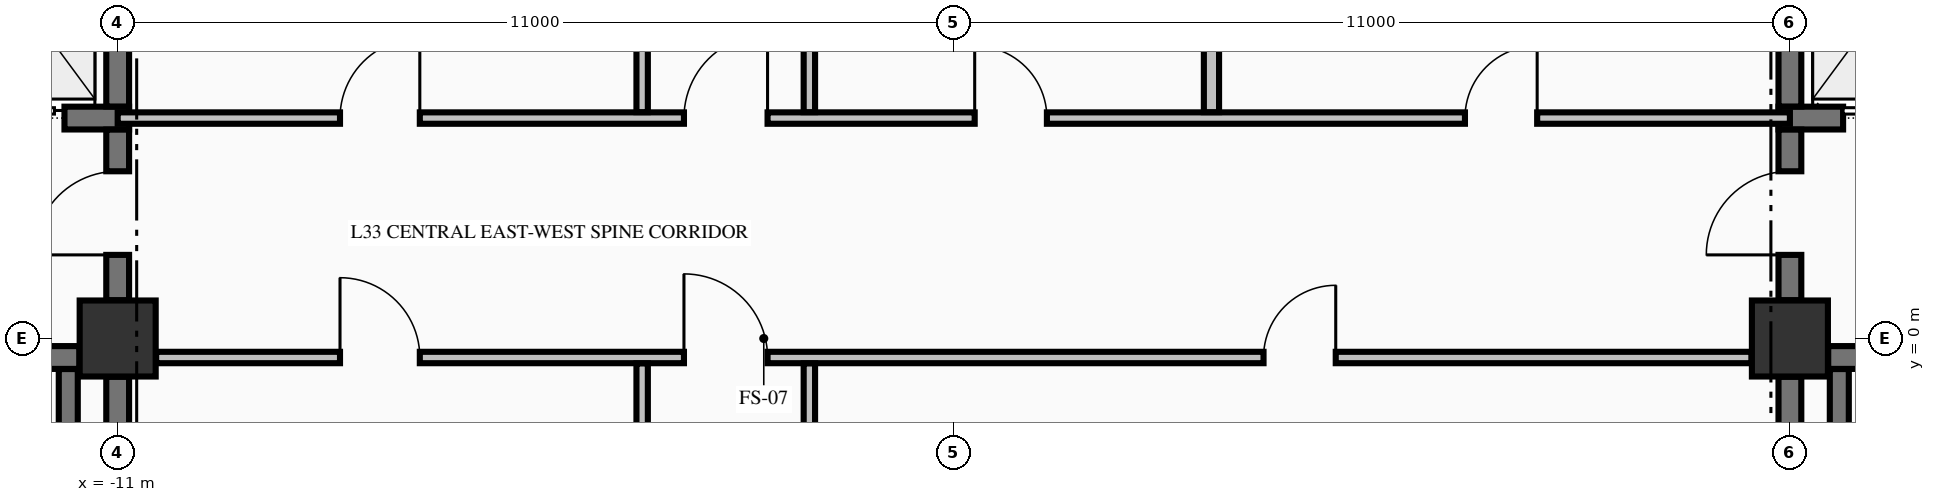
"""IFC4 building model, lengths in metres.
Left out: names, types, materials, properties, quantities, classifications, styles, units other than length and angle.
Written with IfcOpenShell. Run it as: python <this file> out.ifc"""

import sys

from ifc_helpers import new_model, si_unit, direction, frame, frame_2d, origin, origin_2d, place, context, subcontext, project, spatial, rectangle, extrude, element, fill, save


model = new_model("IFC4")
c1 = context("Model", 3, precision=1e-05, world=origin(), true_north=direction((0.0, 1.0)))
c2 = subcontext(c1, "Body", "Model", "MODEL_VIEW")
j1 = project(units=[si_unit("LENGTHUNIT", "METRE"), si_unit("PLANEANGLEUNIT", "RADIAN")], contexts=[c1])
p1 = place(None, origin())
s1 = spatial("IfcSite", under=j1, at=p1, CompositionType="ELEMENT")
p2 = place(p1, origin())
s2 = spatial("IfcBuilding", under=s1, at=p2, CompositionType="ELEMENT")
p3 = place(p2, frame((0.0, 0.0, 132.06)))
s3 = spatial("IfcBuildingStorey", under=s2, at=p3, CompositionType="ELEMENT", Elevation=132.06)
for number, where, z_axis, x_axis in (
    (1, (-11.0, 0.0, -0.25), (0.0, 0.0, 1.0), (1.0, 0.0, 0.0)),
    (2, (11.0, 0.0, -0.25), (0.0, 0.0, 1.0), (1.0, 0.0, 0.0)),
):
    element("IfcColumn", number, at=place(p3, frame(where, z_axis=z_axis, x_axis=x_axis)), inside=s3, PredefinedType="COLUMN", context=c2, shape_type="SweptSolid", body=[
        extrude(rectangle(XDim=1.0, YDim=1.0, at=origin_2d()), origin(), (0.0, 0.0, 1.0), 3.57),
    ])
p4 = place(p3, frame((-19.496, -0.25, 0.0), z_axis=(0.0, 0.0, 1.0), x_axis=(1.0, 0.0, 0.0)))
e3 = element("IfcWall", 3, at=p4, inside=s3, PredefinedType="SHEAR", context=c2, shape_type="SweptSolid", body=[
    extrude(rectangle(XDim=7.992, YDim=0.3, at=frame_2d((3.996, 0.0))), origin(), (0.0, 0.0, 1.0), 3.32),
])
p5 = place(p4, frame((5.796, 0.0, 0.0)))
e4 = element("IfcOpeningElement", 4, at=p5, cuts=e3, PredefinedType="OPENING", context=c2, shape_type="SweptSolid", body=[
    extrude(rectangle(XDim=1.1, YDim=2.15, at=frame_2d((0.55, 1.075))), frame((0.0, 0.16, 0.0), z_axis=(0.0, -1.0, 0.0), x_axis=(1.0, 0.0, 0.0)), (0.0, 0.0, 1.0), 0.32),
])
p6 = place(p3, frame((11.504, -0.25, 0.0), z_axis=(0.0, 0.0, 1.0), x_axis=(1.0, 0.0, 0.0)))
e5 = element("IfcWall", 5, at=p6, inside=s3, PredefinedType="SHEAR", context=c2, shape_type="SweptSolid", body=[
    extrude(rectangle(XDim=3.371, YDim=0.3, at=frame_2d((1.686, 0.0))), origin(), (0.0, 0.0, 1.0), 3.32),
])
p7 = place(p6, frame((1.096, 0.0, 0.0)))
e6 = element("IfcOpeningElement", 6, at=p7, cuts=e5, PredefinedType="OPENING", context=c2, shape_type="SweptSolid", body=[
    extrude(rectangle(XDim=1.1, YDim=2.15, at=frame_2d((0.55, 1.075))), frame((0.0, 0.16, 0.0), z_axis=(0.0, -1.0, 0.0), x_axis=(1.0, 0.0, 0.0)), (0.0, 0.0, 1.0), 0.32),
])
p8 = place(p3, frame((-14.875, 2.9, 0.0), z_axis=(0.0, 0.0, 1.0), x_axis=(1.0, 0.0, 0.0)))
e7 = element("IfcWall", 7, at=p8, inside=s3, PredefinedType="SHEAR", context=c2, shape_type="SweptSolid", body=[
    extrude(rectangle(XDim=4.025, YDim=0.3, at=frame_2d((2.012, 0.0))), origin(), (0.0, 0.0, 1.0), 3.32),
])
p9 = place(p8, frame((2.075, 0.0, 0.0)))
e8 = element("IfcOpeningElement", 8, at=p9, cuts=e7, PredefinedType="OPENING", context=c2, shape_type="SweptSolid", body=[
    extrude(rectangle(XDim=1.1, YDim=2.2, at=frame_2d((0.55, 1.1))), frame((0.0, 0.16, 0.0), z_axis=(0.0, -1.0, 0.0), x_axis=(1.0, 0.0, 0.0)), (0.0, 0.0, 1.0), 0.32),
])
p10 = place(p3, frame((10.85, 2.9, 0.0), z_axis=(0.0, 0.0, 1.0), x_axis=(1.0, 0.0, 0.0)))
e9 = element("IfcWall", 9, at=p10, inside=s3, PredefinedType="SHEAR", context=c2, shape_type="SweptSolid", body=[
    extrude(rectangle(XDim=4.025, YDim=0.3, at=frame_2d((2.012, 0.0))), origin(), (0.0, 0.0, 1.0), 3.32),
])
p11 = place(p10, frame((0.85, 0.0, 0.0)))
e10 = element("IfcOpeningElement", 10, at=p11, cuts=e9, PredefinedType="OPENING", context=c2, shape_type="SweptSolid", body=[
    extrude(rectangle(XDim=1.1, YDim=2.2, at=frame_2d((0.55, 1.1))), frame((0.0, 0.16, 0.0), z_axis=(0.0, -1.0, 0.0), x_axis=(1.0, 0.0, 0.0)), (0.0, 0.0, 1.0), 0.32),
])
p12 = place(p3, frame((-10.494, -0.25, 0.0), z_axis=(0.0, 0.0, 1.0), x_axis=(1.0, 0.0, 0.0)))
e11 = element("IfcWall", 11, at=p12, inside=s3, PredefinedType="PARTITIONING", context=c2, shape_type="SweptSolid", body=[
    extrude(rectangle(XDim=20.988, YDim=0.15, at=frame_2d((10.494, 0.0))), origin(), (0.0, 0.0, 1.0), 3.32),
])
p13 = place(p12, frame((6.944, 0.0, 0.0)))
e12 = element("IfcOpeningElement", 12, at=p13, cuts=e11, PredefinedType="OPENING", context=c2, shape_type="SweptSolid", body=[
    extrude(rectangle(XDim=1.1, YDim=2.15, at=frame_2d((0.55, 1.075))), frame((0.0, 0.085, 0.0), z_axis=(0.0, -1.0, 0.0), x_axis=(1.0, 0.0, 0.0)), (0.0, 0.0, 1.0), 0.17),
])
p14 = place(p12, frame((2.419, 0.0, 0.0)))
e13 = element("IfcOpeningElement", 13, at=p14, cuts=e11, PredefinedType="OPENING", context=c2, shape_type="SweptSolid", body=[
    extrude(rectangle(XDim=1.05, YDim=2.15, at=frame_2d((0.525, 1.075))), frame((0.0, 0.085, 0.0), z_axis=(0.0, -1.0, 0.0), x_axis=(1.0, 0.0, 0.0)), (0.0, 0.0, 1.0), 0.17),
])
p15 = place(p12, frame((14.569, 0.0, 0.0)))
e14 = element("IfcOpeningElement", 14, at=p15, cuts=e11, PredefinedType="OPENING", context=c2, shape_type="SweptSolid", body=[
    extrude(rectangle(XDim=0.95, YDim=2.15, at=frame_2d((0.475, 1.075))), frame((0.0, 0.085, 0.0), z_axis=(0.0, -1.0, 0.0), x_axis=(1.0, 0.0, 0.0)), (0.0, 0.0, 1.0), 0.17),
])
p16 = place(p3, frame((-11.0, 2.9, 0.0), z_axis=(0.0, 0.0, 1.0), x_axis=(1.0, 0.0, 0.0)))
e15 = element("IfcWall", 15, at=p16, inside=s3, PredefinedType="PARTITIONING", context=c2, shape_type="SweptSolid", body=[
    extrude(rectangle(XDim=22.0, YDim=0.15, at=frame_2d((11.0, 0.0))), origin(), (0.0, 0.0, 1.0), 3.32),
])
p17 = place(p16, frame((7.45, 0.0, 0.0)))
e16 = element("IfcOpeningElement", 16, at=p17, cuts=e15, PredefinedType="OPENING", context=c2, shape_type="SweptSolid", body=[
    extrude(rectangle(XDim=1.1, YDim=2.15, at=frame_2d((0.55, 1.075))), frame((0.0, 0.085, 0.0), z_axis=(0.0, -1.0, 0.0), x_axis=(1.0, 0.0, 0.0)), (0.0, 0.0, 1.0), 0.17),
])
p18 = place(p16, frame((2.925, 0.0, 0.0)))
e17 = element("IfcOpeningElement", 17, at=p18, cuts=e15, PredefinedType="OPENING", context=c2, shape_type="SweptSolid", body=[
    extrude(rectangle(XDim=1.05, YDim=2.15, at=frame_2d((0.525, 1.075))), frame((0.0, 0.085, 0.0), z_axis=(0.0, -1.0, 0.0), x_axis=(1.0, 0.0, 0.0)), (0.0, 0.0, 1.0), 0.17),
])
p19 = place(p16, frame((11.275, 0.0, 0.0)))
e18 = element("IfcOpeningElement", 18, at=p19, cuts=e15, PredefinedType="OPENING", context=c2, shape_type="SweptSolid", body=[
    extrude(rectangle(XDim=0.95, YDim=2.15, at=frame_2d((0.475, 1.075))), frame((0.0, 0.085, 0.0), z_axis=(0.0, -1.0, 0.0), x_axis=(1.0, 0.0, 0.0)), (0.0, 0.0, 1.0), 0.17),
])
p20 = place(p16, frame((17.725, 0.0, 0.0)))
e19 = element("IfcOpeningElement", 19, at=p20, cuts=e15, PredefinedType="OPENING", context=c2, shape_type="SweptSolid", body=[
    extrude(rectangle(XDim=0.95, YDim=2.15, at=frame_2d((0.475, 1.075))), frame((0.0, 0.085, 0.0), z_axis=(0.0, -1.0, 0.0), x_axis=(1.0, 0.0, 0.0)), (0.0, 0.0, 1.0), 0.17),
])
p21 = place(p3, frame((-11.65, -9.798, 0.0), z_axis=(0.0, 0.0, 1.0), x_axis=(0.0, 1.0, 0.0)))
e20 = element("IfcWall", 20, at=p21, inside=s3, PredefinedType="SOLIDWALL", context=c2, shape_type="SweptSolid", body=[
    extrude(rectangle(XDim=9.396, YDim=0.25, at=frame_2d((4.698, 0.0))), origin(), (0.0, 0.0, 1.0), 3.32),
])
p22 = place(p3, frame((-11.0, -9.446, 0.0), z_axis=(0.0, 0.0, 1.0), x_axis=(0.0, 1.0, 0.0)))
e21 = element("IfcWall", 21, at=p22, inside=s3, PredefinedType="SHEAR", context=c2, shape_type="SweptSolid", body=[
    extrude(rectangle(XDim=8.942, YDim=0.3, at=frame_2d((4.471, 0.0))), origin(), (0.0, 0.0, 1.0), 3.32),
])
p23 = place(p3, frame((-11.0, 0.504, 0.0), z_axis=(0.0, 0.0, 1.0), x_axis=(0.0, 1.0, 0.0)))
e22 = element("IfcWall", 22, at=p23, inside=s3, PredefinedType="SHEAR", context=c2, shape_type="SweptSolid", body=[
    extrude(rectangle(XDim=2.244, YDim=0.3, at=frame_2d((1.122, 0.0))), origin(), (0.0, 0.0, 1.0), 3.32),
])
p24 = place(p23, frame((0.596, 0.0, 0.0)))
e23 = element("IfcOpeningElement", 23, at=p24, cuts=e22, PredefinedType="OPENING", context=c2, shape_type="SweptSolid", body=[
    extrude(rectangle(XDim=1.1, YDim=2.15, at=frame_2d((0.55, 1.075))), frame((0.0, 0.16, 0.0), z_axis=(0.0, -1.0, 0.0), x_axis=(1.0, 0.0, 0.0)), (0.0, 0.0, 1.0), 0.32),
])
p25 = place(p3, frame((-11.0, 3.052, 0.0), z_axis=(0.0, 0.0, 1.0), x_axis=(0.0, 1.0, 0.0)))
e24 = element("IfcWall", 24, at=p25, inside=s3, PredefinedType="SHEAR", context=c2, shape_type="SweptSolid", body=[
    extrude(rectangle(XDim=2.496, YDim=0.3, at=frame_2d((1.248, 0.0))), origin(), (0.0, 0.0, 1.0), 3.32),
])
p26 = place(p3, frame((11.0, -9.446, 0.0), z_axis=(0.0, 0.0, 1.0), x_axis=(0.0, 1.0, 0.0)))
e25 = element("IfcWall", 25, at=p26, inside=s3, PredefinedType="SHEAR", context=c2, shape_type="SweptSolid", body=[
    extrude(rectangle(XDim=8.942, YDim=0.3, at=frame_2d((4.471, 0.0))), origin(), (0.0, 0.0, 1.0), 3.32),
])
p27 = place(p3, frame((11.0, 0.504, 0.0), z_axis=(0.0, 0.0, 1.0), x_axis=(0.0, 1.0, 0.0)))
e26 = element("IfcWall", 26, at=p27, inside=s3, PredefinedType="SHEAR", context=c2, shape_type="SweptSolid", body=[
    extrude(rectangle(XDim=2.244, YDim=0.3, at=frame_2d((1.122, 0.0))), origin(), (0.0, 0.0, 1.0), 3.32),
])
p28 = place(p27, frame((0.596, 0.0, 0.0)))
e27 = element("IfcOpeningElement", 27, at=p28, cuts=e26, PredefinedType="OPENING", context=c2, shape_type="SweptSolid", body=[
    extrude(rectangle(XDim=1.1, YDim=2.15, at=frame_2d((0.55, 1.075))), frame((0.0, 0.16, 0.0), z_axis=(0.0, -1.0, 0.0), x_axis=(1.0, 0.0, 0.0)), (0.0, 0.0, 1.0), 0.32),
])
p29 = place(p3, frame((11.0, 3.052, 0.0), z_axis=(0.0, 0.0, 1.0), x_axis=(0.0, 1.0, 0.0)))
e28 = element("IfcWall", 28, at=p29, inside=s3, PredefinedType="SHEAR", context=c2, shape_type="SweptSolid", body=[
    extrude(rectangle(XDim=2.496, YDim=0.3, at=frame_2d((1.248, 0.0))), origin(), (0.0, 0.0, 1.0), 3.32),
])
p30 = place(p3, frame((11.65, -9.798, 0.0), z_axis=(0.0, 0.0, 1.0), x_axis=(0.0, 1.0, 0.0)))
e29 = element("IfcWall", 29, at=p30, inside=s3, PredefinedType="SOLIDWALL", context=c2, shape_type="SweptSolid", body=[
    extrude(rectangle(XDim=9.396, YDim=0.25, at=frame_2d((4.698, 0.0))), origin(), (0.0, 0.0, 1.0), 3.32),
])
p31 = place(p3, frame((-4.1, -9.872, 0.0), z_axis=(0.0, 0.0, 1.0), x_axis=(0.0, 1.0, 0.0)))
e30 = element("IfcWall", 30, at=p31, inside=s3, PredefinedType="PARTITIONING", context=c2, shape_type="SweptSolid", body=[
    extrude(rectangle(XDim=9.544, YDim=0.15, at=frame_2d((4.772, 0.0))), origin(), (0.0, 0.0, 1.0), 3.32),
])
p32 = place(p3, frame((-4.1, 2.978, 0.0), z_axis=(0.0, 0.0, 1.0), x_axis=(0.0, 1.0, 0.0)))
e31 = element("IfcWall", 31, at=p32, inside=s3, PredefinedType="PARTITIONING", context=c2, shape_type="SweptSolid", body=[
    extrude(rectangle(XDim=7.444, YDim=0.15, at=frame_2d((3.722, 0.0))), origin(), (0.0, 0.0, 1.0), 3.32),
])
p33 = place(p3, frame((-1.9, -4.747, 0.0), z_axis=(0.0, 0.0, 1.0), x_axis=(0.0, 1.0, 0.0)))
e32 = element("IfcWall", 32, at=p33, inside=s3, PredefinedType="PARTITIONING", context=c2, shape_type="SweptSolid", body=[
    extrude(rectangle(XDim=4.419, YDim=0.15, at=frame_2d((2.209, 0.0))), origin(), (0.0, 0.0, 1.0), 3.32),
])
p34 = place(p3, frame((-1.9, 2.978, 0.0), z_axis=(0.0, 0.0, 1.0), x_axis=(0.0, 1.0, 0.0)))
e33 = element("IfcWall", 33, at=p34, inside=s3, PredefinedType="PARTITIONING", context=c2, shape_type="SweptSolid", body=[
    extrude(rectangle(XDim=7.444, YDim=0.15, at=frame_2d((3.722, 0.0))), origin(), (0.0, 0.0, 1.0), 3.32),
])
p35 = place(p3, frame((3.39, 2.978, 0.0), z_axis=(0.0, 0.0, 1.0), x_axis=(0.0, 1.0, 0.0)))
e34 = element("IfcWall", 34, at=p35, inside=s3, PredefinedType="PARTITIONING", context=c2, shape_type="SweptSolid", body=[
    extrude(rectangle(XDim=7.444, YDim=0.2, at=frame_2d((3.722, 0.0))), origin(), (0.0, 0.0, 1.0), 3.32),
])
p36 = place(p24, origin())
e35 = element("IfcDoor", 35, at=p36, inside=s3, OperationType="SINGLE_SWING_LEFT", PredefinedType="DOOR", context=c2, shape_type="SweptSolid", body=[
    extrude(rectangle(XDim=1.1, YDim=2.15, at=frame_2d((0.55, 1.075))), frame((0.0, 0.025, 0.0), z_axis=(0.0, -1.0, 0.0), x_axis=(1.0, 0.0, 0.0)), (0.0, 0.0, 1.0), 0.05),
])
fill(e23, e35)
p37 = place(p9, origin())
e36 = element("IfcDoor", 36, at=p37, inside=s3, OperationType="SLIDING_TO_LEFT", PredefinedType="DOOR", context=c2, shape_type="SweptSolid", body=[
    extrude(rectangle(XDim=1.1, YDim=2.2, at=frame_2d((0.55, 1.1))), frame((0.0, 0.025, 0.0), z_axis=(0.0, -1.0, 0.0), x_axis=(1.0, 0.0, 0.0)), (0.0, 0.0, 1.0), 0.05),
])
fill(e8, e36)
p38 = place(p28, origin())
e37 = element("IfcDoor", 37, at=p38, inside=s3, OperationType="SINGLE_SWING_LEFT", PredefinedType="DOOR", context=c2, shape_type="SweptSolid", body=[
    extrude(rectangle(XDim=1.1, YDim=2.15, at=frame_2d((0.55, 1.075))), frame((0.0, 0.025, 0.0), z_axis=(0.0, -1.0, 0.0), x_axis=(1.0, 0.0, 0.0)), (0.0, 0.0, 1.0), 0.05),
])
fill(e27, e37)
p39 = place(p11, origin())
e38 = element("IfcDoor", 38, at=p39, inside=s3, OperationType="SLIDING_TO_RIGHT", PredefinedType="DOOR", context=c2, shape_type="SweptSolid", body=[
    extrude(rectangle(XDim=1.1, YDim=2.2, at=frame_2d((0.55, 1.1))), frame((0.0, 0.025, 0.0), z_axis=(0.0, -1.0, 0.0), x_axis=(1.0, 0.0, 0.0)), (0.0, 0.0, 1.0), 0.05),
])
fill(e10, e38)
p40 = place(p17, origin())
e39 = element("IfcDoor", 39, at=p40, inside=s3, OperationType="SINGLE_SWING_RIGHT", PredefinedType="DOOR", context=c2, shape_type="SweptSolid", body=[
    extrude(rectangle(XDim=1.1, YDim=2.15, at=frame_2d((0.55, 1.075))), frame((0.0, 0.025, 0.0), z_axis=(0.0, -1.0, 0.0), x_axis=(1.0, 0.0, 0.0)), (0.0, 0.0, 1.0), 0.05),
])
fill(e16, e39)
p41 = place(p13, origin())
e40 = element("IfcDoor", 40, at=p41, inside=s3, OperationType="SINGLE_SWING_LEFT", PredefinedType="DOOR", context=c2, shape_type="SweptSolid", body=[
    extrude(rectangle(XDim=1.1, YDim=2.15, at=frame_2d((0.55, 1.075))), frame((0.0, 0.025, 0.0), z_axis=(0.0, -1.0, 0.0), x_axis=(1.0, 0.0, 0.0)), (0.0, 0.0, 1.0), 0.05),
])
fill(e12, e40)
p42 = place(p18, origin())
e41 = element("IfcDoor", 41, at=p42, inside=s3, OperationType="SINGLE_SWING_RIGHT", PredefinedType="DOOR", context=c2, shape_type="SweptSolid", body=[
    extrude(rectangle(XDim=1.05, YDim=2.15, at=frame_2d((0.525, 1.075))), frame((0.0, 0.025, 0.0), z_axis=(0.0, -1.0, 0.0), x_axis=(1.0, 0.0, 0.0)), (0.0, 0.0, 1.0), 0.05),
])
fill(e17, e41)
p43 = place(p19, origin())
e42 = element("IfcDoor", 42, at=p43, inside=s3, OperationType="SINGLE_SWING_LEFT", PredefinedType="DOOR", context=c2, shape_type="SweptSolid", body=[
    extrude(rectangle(XDim=0.95, YDim=2.15, at=frame_2d((0.475, 1.075))), frame((0.0, 0.025, 0.0), z_axis=(0.0, -1.0, 0.0), x_axis=(1.0, 0.0, 0.0)), (0.0, 0.0, 1.0), 0.05),
])
fill(e18, e42)
p44 = place(p20, origin())
e43 = element("IfcDoor", 43, at=p44, inside=s3, OperationType="SINGLE_SWING_RIGHT", PredefinedType="DOOR", context=c2, shape_type="SweptSolid", body=[
    extrude(rectangle(XDim=0.95, YDim=2.15, at=frame_2d((0.475, 1.075))), frame((0.0, 0.025, 0.0), z_axis=(0.0, -1.0, 0.0), x_axis=(1.0, 0.0, 0.0)), (0.0, 0.0, 1.0), 0.05),
])
fill(e19, e43)
p45 = place(p14, origin())
e44 = element("IfcDoor", 44, at=p45, inside=s3, OperationType="SINGLE_SWING_LEFT", PredefinedType="DOOR", context=c2, shape_type="SweptSolid", body=[
    extrude(rectangle(XDim=1.05, YDim=2.15, at=frame_2d((0.525, 1.075))), frame((0.0, 0.025, 0.0), z_axis=(0.0, -1.0, 0.0), x_axis=(1.0, 0.0, 0.0)), (0.0, 0.0, 1.0), 0.05),
])
fill(e13, e44)
p46 = place(p15, origin())
e45 = element("IfcDoor", 45, at=p46, inside=s3, OperationType="SINGLE_SWING_RIGHT", PredefinedType="DOOR", context=c2, shape_type="SweptSolid", body=[
    extrude(rectangle(XDim=0.95, YDim=2.15, at=frame_2d((0.475, 1.075))), frame((0.0, 0.025, 0.0), z_axis=(0.0, -1.0, 0.0), x_axis=(1.0, 0.0, 0.0)), (0.0, 0.0, 1.0), 0.05),
])
fill(e14, e45)
save(model, sys.argv[1])
